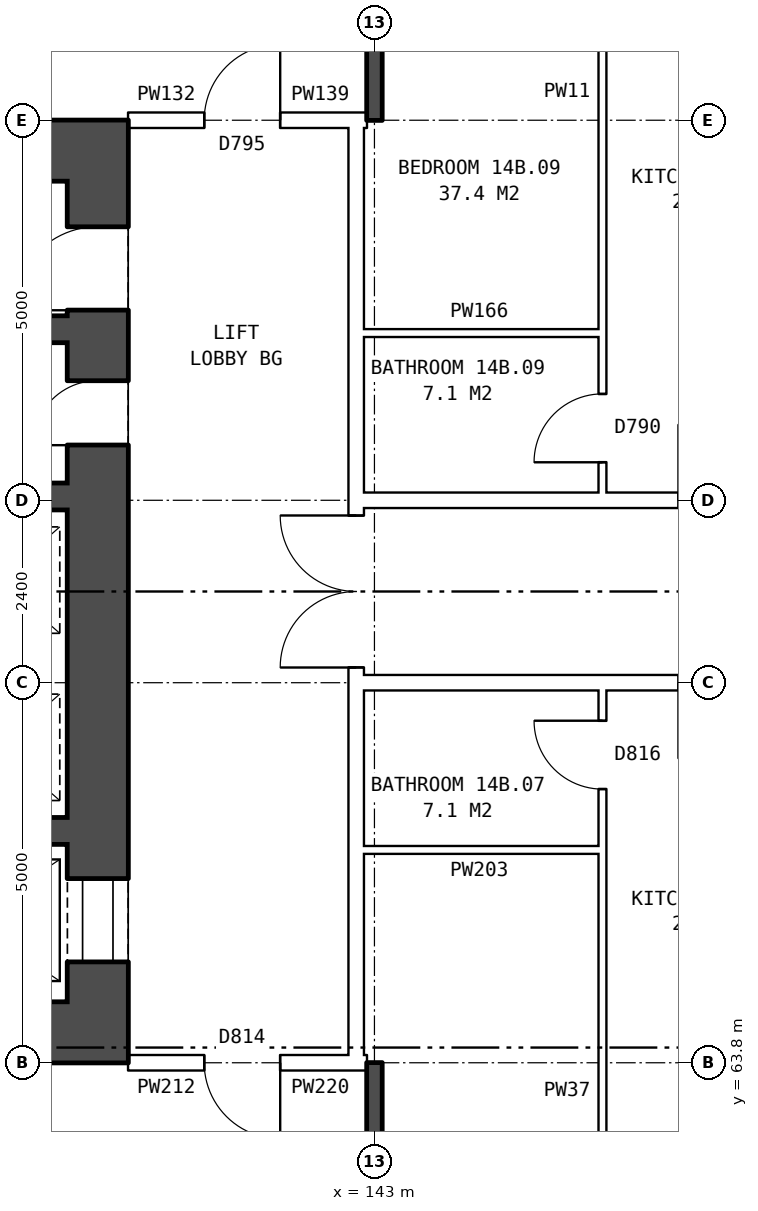
"""IFC4 building model, lengths in metres.
Left out: names, types, materials, properties, quantities, classifications, styles, units other than length and angle.
Written with IfcOpenShell. Run it as: python <this file> out.ifc"""

import sys

from ifc_helpers import new_model, si_unit, direction, frame, frame_2d, origin, place, context, subcontext, project, spatial, rectangle, extrude, element, fill, save


model = new_model("IFC4")
c1 = context("Model", 3, precision=1e-05, world=origin(), true_north=direction((0.0, 1.0)))
c2 = subcontext(c1, "Body", "Model", "MODEL_VIEW")
j1 = project(units=[si_unit("LENGTHUNIT", "METRE"), si_unit("PLANEANGLEUNIT", "RADIAN")], contexts=[c1])
p1 = place(None, origin())
s1 = spatial("IfcSite", under=j1, at=p1, CompositionType="ELEMENT")
p2 = place(p1, origin())
s2 = spatial("IfcBuilding", under=s1, at=p2, CompositionType="ELEMENT")
p3 = place(p2, frame((0.0, 0.0, 53.6)))
s3 = spatial("IfcBuildingStorey", under=s2, at=p3, CompositionType="ELEMENT", Elevation=53.6)
p4 = place(p3, frame((139.36, 64.6, 0.0), z_axis=(0.0, 0.0, 1.0), x_axis=(0.0, 1.0, 0.0)))
e1 = element("IfcWall", 1, at=p4, inside=s3, PredefinedType="SHEAR", context=c2, shape_type="SweptSolid", body=[
    extrude(rectangle(XDim=10.8, YDim=0.8, at=frame_2d((5.4, 0.0))), origin(), (0.0, 0.0, 1.0), 2.85),
])
p5 = place(p4, frame((0.525, 0.0, 0.0)))
e2 = element("IfcOpeningElement", 2, at=p5, cuts=e1, PredefinedType="OPENING", context=c2, shape_type="SweptSolid", body=[
    extrude(rectangle(XDim=1.1, YDim=2.1, at=frame_2d((0.55, 1.05))), frame((0.0, 0.41, 0.0), z_axis=(0.0, -1.0, 0.0), x_axis=(1.0, 0.0, 0.0)), (0.0, 0.0, 1.0), 0.82),
])
p6 = place(p4, frame((9.1, 0.0, 0.0)))
e3 = element("IfcOpeningElement", 3, at=p6, cuts=e1, PredefinedType="OPENING", context=c2, shape_type="SweptSolid", body=[
    extrude(rectangle(XDim=1.1, YDim=2.1, at=frame_2d((0.55, 1.05))), frame((0.0, 0.41, 0.0), z_axis=(0.0, -1.0, 0.0), x_axis=(1.0, 0.0, 0.0)), (0.0, 0.0, 1.0), 0.82),
])
p7 = place(p4, frame((7.325, 0.0, 0.0)))
e4 = element("IfcOpeningElement", 4, at=p7, cuts=e1, PredefinedType="OPENING", context=c2, shape_type="SweptSolid", body=[
    extrude(rectangle(XDim=0.85, YDim=2.1, at=frame_2d((0.425, 1.05))), frame((0.0, 0.41, 0.0), z_axis=(0.0, -1.0, 0.0), x_axis=(1.0, 0.0, 0.0)), (0.0, 0.0, 1.0), 0.82),
])
for number, where, z_axis, x_axis in (
    (5, (139.76, 64.2, 0.0), (0.0, 0.0, 1.0), (-1.0, 0.0, 0.0)),
    (6, (139.76, 75.8, 0.0), (0.0, 0.0, 1.0), (-1.0, 0.0, 0.0)),
):
    element("IfcWall", number, at=place(p3, frame(where, z_axis=z_axis, x_axis=x_axis)), inside=s3, PredefinedType="SHEAR", context=c2, shape_type="SweptSolid", body=[
        extrude(rectangle(XDim=8.4, YDim=0.8, at=frame_2d((4.2, 0.0))), origin(), (0.0, 0.0, 1.0), 2.85),
    ])
p8 = place(p3, frame((138.96, 66.85, 0.0), z_axis=(0.0, 0.0, 1.0), x_axis=(-1.0, 0.0, 0.0)))
e7 = element("IfcWall", 7, at=p8, inside=s3, PredefinedType="SHEAR", context=c2, shape_type="SweptSolid", body=[
    extrude(rectangle(XDim=3.925, YDim=0.35, at=frame_2d((1.962, 0.0))), origin(), (0.0, 0.0, 1.0), 2.85),
])
p9 = place(p3, frame((138.96, 71.25, 0.0), z_axis=(0.0, 0.0, 1.0), x_axis=(-1.0, 0.0, 0.0)))
e8 = element("IfcWall", 8, at=p9, inside=s3, PredefinedType="SHEAR", context=c2, shape_type="SweptSolid", body=[
    extrude(rectangle(XDim=6.8, YDim=0.35, at=frame_2d((3.4, 0.0))), origin(), (0.0, 0.0, 1.0), 2.85),
])
p10 = place(p9, frame((4.425, 0.0, 0.0)))
e9 = element("IfcOpeningElement", 9, at=p10, cuts=e8, PredefinedType="OPENING", context=c2, shape_type="SweptSolid", body=[
    extrude(rectangle(XDim=1.1, YDim=2.1, at=frame_2d((0.55, 1.05))), frame((0.0, 0.185, 0.0), z_axis=(0.0, -1.0, 0.0), x_axis=(1.0, 0.0, 0.0)), (0.0, 0.0, 1.0), 0.37),
])
p11 = place(p9, frame((2.75, 0.0, 0.0)))
e10 = element("IfcOpeningElement", 10, at=p11, cuts=e8, PredefinedType="OPENING", context=c2, shape_type="SweptSolid", body=[
    extrude(rectangle(XDim=0.85, YDim=2.1, at=frame_2d((0.425, 1.05))), frame((0.0, 0.185, 0.0), z_axis=(0.0, -1.0, 0.0), x_axis=(1.0, 0.0, 0.0)), (0.0, 0.0, 1.0), 0.37),
])
p12 = place(p3, frame((138.96, 73.45, 0.0), z_axis=(0.0, 0.0, 1.0), x_axis=(-1.0, 0.0, 0.0)))
e11 = element("IfcWall", 11, at=p12, inside=s3, PredefinedType="SHEAR", context=c2, shape_type="SweptSolid", body=[
    extrude(rectangle(XDim=2.075, YDim=0.35, at=frame_2d((1.038, 0.0))), origin(), (0.0, 0.0, 1.0), 2.85),
])
p13 = place(p3, frame((142.76, 63.9, 0.0), z_axis=(0.0, 0.0, 1.0), x_axis=(0.0, 1.0, 0.0)))
e12 = element("IfcWall", 12, at=p13, inside=s3, PredefinedType="PARTITIONING", context=c2, shape_type="SweptSolid", body=[
    extrude(rectangle(XDim=12.2, YDim=0.2, at=frame_2d((6.1, 0.0))), origin(), (0.0, 0.0, 1.0), 2.85),
])
p14 = place(p13, frame((5.1, 0.0, 0.0)))
e13 = element("IfcOpeningElement", 13, at=p14, cuts=e12, PredefinedType="OPENING", context=c2, shape_type="SweptSolid", body=[
    extrude(rectangle(XDim=2.0, YDim=2.1, at=frame_2d((1.0, 1.05))), frame((0.0, 0.11, 0.0), z_axis=(0.0, -1.0, 0.0), x_axis=(1.0, 0.0, 0.0)), (0.0, 0.0, 1.0), 0.22),
])
p15 = place(p3, frame((139.76, 63.8, 0.0), z_axis=(0.0, 0.0, 1.0), x_axis=(1.0, 0.0, 0.0)))
e14 = element("IfcWall", 14, at=p15, inside=s3, PredefinedType="PARTITIONING", context=c2, shape_type="SweptSolid", body=[
    extrude(rectangle(XDim=3.0, YDim=0.2, at=frame_2d((1.5, 0.0))), origin(), (0.0, 0.0, 1.0), 2.85),
])
p16 = place(p15, frame((1.0, 0.0, 0.0)))
e15 = element("IfcOpeningElement", 15, at=p16, cuts=e14, PredefinedType="OPENING", context=c2, shape_type="SweptSolid", body=[
    extrude(rectangle(XDim=1.0, YDim=2.1, at=frame_2d((0.5, 1.05))), frame((0.0, 0.11, 0.0), z_axis=(0.0, -1.0, 0.0), x_axis=(1.0, 0.0, 0.0)), (0.0, 0.0, 1.0), 0.22),
])
p17 = place(p3, frame((142.76, 63.8, 0.0), z_axis=(0.0, 0.0, 1.0), x_axis=(1.0, 0.0, 0.0)))
e16 = element("IfcWall", 16, at=p17, inside=s3, PredefinedType="PARTITIONING", context=c2, shape_type="SweptSolid", body=[
    extrude(rectangle(XDim=0.14, YDim=0.2, at=frame_2d((0.07, 0.0))), origin(), (0.0, 0.0, 1.0), 2.85),
])
p18 = place(p3, frame((142.76, 66.6, 0.0), z_axis=(0.0, 0.0, 1.0), x_axis=(1.0, 0.0, 0.0)))
e17 = element("IfcWall", 17, at=p18, inside=s3, PredefinedType="PARTITIONING", context=c2, shape_type="SweptSolid", body=[
    extrude(rectangle(XDim=3.24, YDim=0.1, at=frame_2d((1.62, 0.0))), origin(), (0.0, 0.0, 1.0), 2.85),
])
p19 = place(p3, frame((142.76, 68.8, 0.0), z_axis=(0.0, 0.0, 1.0), x_axis=(1.0, 0.0, 0.0)))
e18 = element("IfcWall", 18, at=p19, inside=s3, PredefinedType="PARTITIONING", context=c2, shape_type="SweptSolid", body=[
    extrude(rectangle(XDim=14.48, YDim=0.2, at=frame_2d((7.24, 0.0))), origin(), (0.0, 0.0, 1.0), 2.85),
])
p20 = place(p19, frame((4.24, 0.0, 0.0)))
e19 = element("IfcOpeningElement", 19, at=p20, cuts=e18, PredefinedType="OPENING", context=c2, shape_type="SweptSolid", body=[
    extrude(rectangle(XDim=1.0, YDim=2.1, at=frame_2d((0.5, 1.05))), frame((0.0, 0.11, 0.0), z_axis=(0.0, -1.0, 0.0), x_axis=(1.0, 0.0, 0.0)), (0.0, 0.0, 1.0), 0.22),
])
p21 = place(p19, frame((7.24, 0.0, 0.0)))
e20 = element("IfcOpeningElement", 20, at=p21, cuts=e18, PredefinedType="OPENING", context=c2, shape_type="SweptSolid", body=[
    extrude(rectangle(XDim=1.0, YDim=2.1, at=frame_2d((0.5, 1.05))), frame((0.0, 0.11, 0.0), z_axis=(0.0, -1.0, 0.0), x_axis=(1.0, 0.0, 0.0)), (0.0, 0.0, 1.0), 0.22),
])
p22 = place(p3, frame((142.76, 71.2, 0.0), z_axis=(0.0, 0.0, 1.0), x_axis=(1.0, 0.0, 0.0)))
e21 = element("IfcWall", 21, at=p22, inside=s3, PredefinedType="PARTITIONING", context=c2, shape_type="SweptSolid", body=[
    extrude(rectangle(XDim=14.48, YDim=0.2, at=frame_2d((7.24, 0.0))), origin(), (0.0, 0.0, 1.0), 2.85),
])
p23 = place(p22, frame((4.24, 0.0, 0.0)))
e22 = element("IfcOpeningElement", 22, at=p23, cuts=e21, PredefinedType="OPENING", context=c2, shape_type="SweptSolid", body=[
    extrude(rectangle(XDim=1.0, YDim=2.1, at=frame_2d((0.5, 1.05))), frame((0.0, 0.11, 0.0), z_axis=(0.0, -1.0, 0.0), x_axis=(1.0, 0.0, 0.0)), (0.0, 0.0, 1.0), 0.22),
])
p24 = place(p22, frame((7.24, 0.0, 0.0)))
e23 = element("IfcOpeningElement", 23, at=p24, cuts=e21, PredefinedType="OPENING", context=c2, shape_type="SweptSolid", body=[
    extrude(rectangle(XDim=1.0, YDim=2.1, at=frame_2d((0.5, 1.05))), frame((0.0, 0.11, 0.0), z_axis=(0.0, -1.0, 0.0), x_axis=(1.0, 0.0, 0.0)), (0.0, 0.0, 1.0), 0.22),
])
p25 = place(p3, frame((142.76, 73.4, 0.0), z_axis=(0.0, 0.0, 1.0), x_axis=(1.0, 0.0, 0.0)))
e24 = element("IfcWall", 24, at=p25, inside=s3, PredefinedType="PARTITIONING", context=c2, shape_type="SweptSolid", body=[
    extrude(rectangle(XDim=3.24, YDim=0.1, at=frame_2d((1.62, 0.0))), origin(), (0.0, 0.0, 1.0), 2.85),
])
p26 = place(p3, frame((139.76, 76.2, 0.0), z_axis=(0.0, 0.0, 1.0), x_axis=(1.0, 0.0, 0.0)))
e25 = element("IfcWall", 25, at=p26, inside=s3, PredefinedType="PARTITIONING", context=c2, shape_type="SweptSolid", body=[
    extrude(rectangle(XDim=3.0, YDim=0.2, at=frame_2d((1.5, 0.0))), origin(), (0.0, 0.0, 1.0), 2.85),
])
p27 = place(p26, frame((1.0, 0.0, 0.0)))
e26 = element("IfcOpeningElement", 26, at=p27, cuts=e25, PredefinedType="OPENING", context=c2, shape_type="SweptSolid", body=[
    extrude(rectangle(XDim=1.0, YDim=2.1, at=frame_2d((0.5, 1.05))), frame((0.0, 0.11, 0.0), z_axis=(0.0, -1.0, 0.0), x_axis=(1.0, 0.0, 0.0)), (0.0, 0.0, 1.0), 0.22),
])
p28 = place(p3, frame((142.76, 76.2, 0.0), z_axis=(0.0, 0.0, 1.0), x_axis=(1.0, 0.0, 0.0)))
e27 = element("IfcWall", 27, at=p28, inside=s3, PredefinedType="PARTITIONING", context=c2, shape_type="SweptSolid", body=[
    extrude(rectangle(XDim=0.14, YDim=0.2, at=frame_2d((0.07, 0.0))), origin(), (0.0, 0.0, 1.0), 2.85),
])
for number, where, z_axis, x_axis in (
    (28, (143.0, 54.36, 0.0), (0.0, 0.0, 1.0), (0.0, 1.0, 0.0)),
    (29, (143.0, 76.2, 0.0), (0.0, 0.0, 1.0), (0.0, 1.0, 0.0)),
):
    element("IfcWall", number, at=place(p3, frame(where, z_axis=z_axis, x_axis=x_axis)), inside=s3, PredefinedType="SOLIDWALL", context=c2, shape_type="SweptSolid", body=[
        extrude(rectangle(XDim=9.44, YDim=0.2, at=frame_2d((4.72, 0.0))), origin(), (0.0, 0.0, 1.0), 2.85),
    ])
p29 = place(p3, frame((146.0, 54.36, 0.0), z_axis=(0.0, 0.0, 1.0), x_axis=(0.0, 1.0, 0.0)))
e30 = element("IfcWall", 30, at=p29, inside=s3, PredefinedType="PARTITIONING", context=c2, shape_type="SweptSolid", body=[
    extrude(rectangle(XDim=14.34, YDim=0.1, at=frame_2d((7.17, 0.0))), origin(), (0.0, 0.0, 1.0), 2.85),
])
p30 = place(p29, frame((4.2, 0.0, 0.0)))
e31 = element("IfcOpeningElement", 31, at=p30, cuts=e30, PredefinedType="OPENING", context=c2, shape_type="SweptSolid", body=[
    extrude(rectangle(XDim=0.9, YDim=2.1, at=frame_2d((0.45, 1.05))), frame((0.0, 0.06, 0.0), z_axis=(0.0, -1.0, 0.0), x_axis=(1.0, 0.0, 0.0)), (0.0, 0.0, 1.0), 0.12),
])
p31 = place(p29, frame((13.04, 0.0, 0.0)))
e32 = element("IfcOpeningElement", 32, at=p31, cuts=e30, PredefinedType="OPENING", context=c2, shape_type="SweptSolid", body=[
    extrude(rectangle(XDim=0.9, YDim=2.1, at=frame_2d((0.45, 1.05))), frame((0.0, 0.06, 0.0), z_axis=(0.0, -1.0, 0.0), x_axis=(1.0, 0.0, 0.0)), (0.0, 0.0, 1.0), 0.12),
])
p32 = place(p3, frame((146.0, 71.3, 0.0), z_axis=(0.0, 0.0, 1.0), x_axis=(0.0, 1.0, 0.0)))
e33 = element("IfcWall", 33, at=p32, inside=s3, PredefinedType="PARTITIONING", context=c2, shape_type="SweptSolid", body=[
    extrude(rectangle(XDim=14.34, YDim=0.1, at=frame_2d((7.17, 0.0))), origin(), (0.0, 0.0, 1.0), 2.85),
])
p33 = place(p32, frame((9.24, 0.0, 0.0)))
e34 = element("IfcOpeningElement", 34, at=p33, cuts=e33, PredefinedType="OPENING", context=c2, shape_type="SweptSolid", body=[
    extrude(rectangle(XDim=0.9, YDim=2.1, at=frame_2d((0.45, 1.05))), frame((0.0, 0.06, 0.0), z_axis=(0.0, -1.0, 0.0), x_axis=(1.0, 0.0, 0.0)), (0.0, 0.0, 1.0), 0.12),
])
p34 = place(p32, frame((0.4, 0.0, 0.0)))
e35 = element("IfcOpeningElement", 35, at=p34, cuts=e33, PredefinedType="OPENING", context=c2, shape_type="SweptSolid", body=[
    extrude(rectangle(XDim=0.9, YDim=2.1, at=frame_2d((0.45, 1.05))), frame((0.0, 0.06, 0.0), z_axis=(0.0, -1.0, 0.0), x_axis=(1.0, 0.0, 0.0)), (0.0, 0.0, 1.0), 0.12),
])
p35 = place(p5, origin())
e36 = element("IfcDoor", 36, at=p35, inside=s3, OperationType="DOUBLE_DOOR_SLIDING", PredefinedType="DOOR", context=c2, shape_type="SweptSolid", body=[
    extrude(rectangle(XDim=1.1, YDim=2.1, at=frame_2d((0.55, 1.05))), frame((0.0, 0.385, 0.0), z_axis=(0.0, -1.0, 0.0), x_axis=(1.0, 0.0, 0.0)), (0.0, 0.0, 1.0), 0.05),
])
fill(e2, e36)
p36 = place(p6, origin())
e37 = element("IfcDoor", 37, at=p36, inside=s3, OperationType="SINGLE_SWING_LEFT", PredefinedType="DOOR", context=c2, shape_type="SweptSolid", body=[
    extrude(rectangle(XDim=1.1, YDim=2.1, at=frame_2d((0.55, 1.05))), frame((0.0, 0.385, 0.0), z_axis=(0.0, -1.0, 0.0), x_axis=(1.0, 0.0, 0.0)), (0.0, 0.0, 1.0), 0.05),
])
fill(e3, e37)
p37 = place(p7, origin())
e38 = element("IfcDoor", 38, at=p37, inside=s3, OperationType="SINGLE_SWING_LEFT", PredefinedType="DOOR", context=c2, shape_type="SweptSolid", body=[
    extrude(rectangle(XDim=0.85, YDim=2.1, at=frame_2d((0.425, 1.05))), frame((0.0, 0.385, 0.0), z_axis=(0.0, -1.0, 0.0), x_axis=(1.0, 0.0, 0.0)), (0.0, 0.0, 1.0), 0.05),
])
fill(e4, e38)
p38 = place(p14, origin())
e39 = element("IfcDoor", 39, at=p38, inside=s3, OperationType="DOUBLE_DOOR_SINGLE_SWING", PredefinedType="DOOR", context=c2, shape_type="SweptSolid", body=[
    extrude(rectangle(XDim=2.0, YDim=2.1, at=frame_2d((1.0, 1.05))), frame((0.0, 0.025, 0.0), z_axis=(0.0, -1.0, 0.0), x_axis=(1.0, 0.0, 0.0)), (0.0, 0.0, 1.0), 0.05),
])
fill(e13, e39)
p39 = place(p16, frame((1.0, 0.0, 0.0), z_axis=(0.0, 0.0, 1.0), x_axis=(-1.0, 0.0, 0.0)))
e40 = element("IfcDoor", 40, at=p39, inside=s3, OperationType="SINGLE_SWING_LEFT", PredefinedType="DOOR", context=c2, shape_type="SweptSolid", body=[
    extrude(rectangle(XDim=1.0, YDim=2.1, at=frame_2d((0.5, 1.05))), frame((0.0, 0.025, 0.0), z_axis=(0.0, -1.0, 0.0), x_axis=(1.0, 0.0, 0.0)), (0.0, 0.0, 1.0), 0.05),
])
fill(e15, e40)
p40 = place(p27, origin())
e41 = element("IfcDoor", 41, at=p40, inside=s3, OperationType="SINGLE_SWING_RIGHT", PredefinedType="DOOR", context=c2, shape_type="SweptSolid", body=[
    extrude(rectangle(XDim=1.0, YDim=2.1, at=frame_2d((0.5, 1.05))), frame((0.0, 0.025, 0.0), z_axis=(0.0, -1.0, 0.0), x_axis=(1.0, 0.0, 0.0)), (0.0, 0.0, 1.0), 0.05),
])
fill(e26, e41)
p41 = place(p31, origin())
e42 = element("IfcDoor", 42, at=p41, inside=s3, OperationType="SINGLE_SWING_RIGHT", PredefinedType="DOOR", context=c2, shape_type="SweptSolid", body=[
    extrude(rectangle(XDim=0.9, YDim=2.1, at=frame_2d((0.45, 1.05))), frame((0.0, 0.025, 0.0), z_axis=(0.0, -1.0, 0.0), x_axis=(1.0, 0.0, 0.0)), (0.0, 0.0, 1.0), 0.05),
])
fill(e32, e42)
p42 = place(p34, origin())
e43 = element("IfcDoor", 43, at=p42, inside=s3, OperationType="SINGLE_SWING_LEFT", PredefinedType="DOOR", context=c2, shape_type="SweptSolid", body=[
    extrude(rectangle(XDim=0.9, YDim=2.1, at=frame_2d((0.45, 1.05))), frame((0.0, 0.025, 0.0), z_axis=(0.0, -1.0, 0.0), x_axis=(1.0, 0.0, 0.0)), (0.0, 0.0, 1.0), 0.05),
])
fill(e35, e43)
save(model, sys.argv[1])
